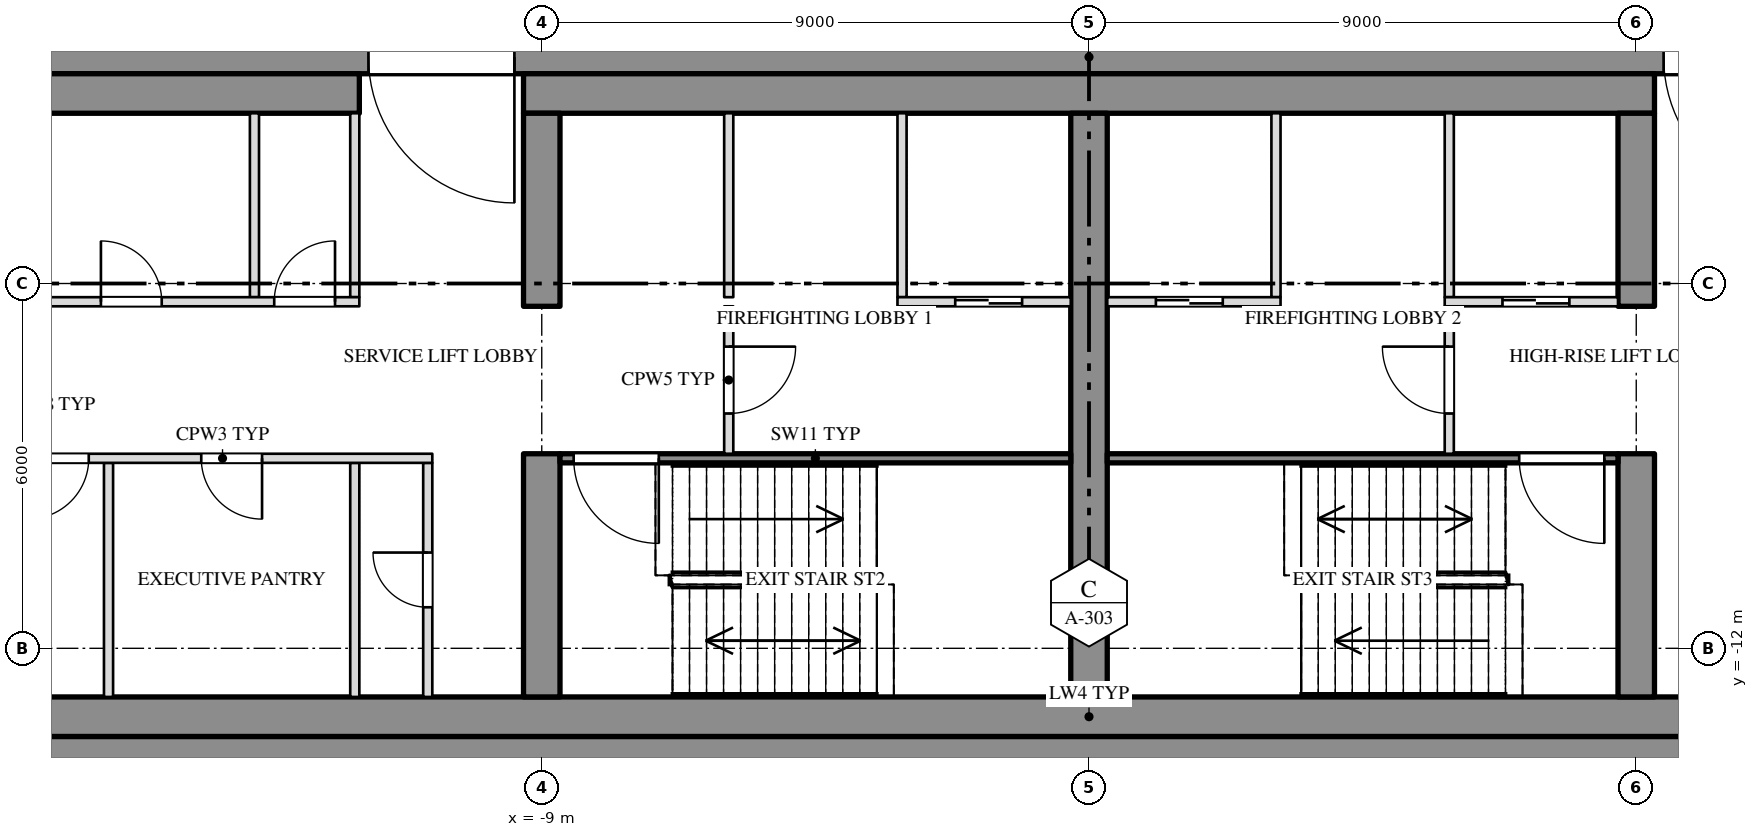
"""IFC4 building model, lengths in metres.
Left out: names, types, materials, properties, quantities, classifications, styles, units other than length and angle.
Written with IfcOpenShell. Run it as: python <this file> out.ifc"""

import sys

from ifc_helpers import new_model, si_unit, direction, frame, frame_2d, origin, place, context, subcontext, project, spatial, rectangle, extrude, element, fill, save


model = new_model("IFC4")
c1 = context("Model", 3, precision=1e-05, world=origin(), true_north=direction((0.0, 1.0)))
c2 = subcontext(c1, "Body", "Model", "MODEL_VIEW")
j1 = project(units=[si_unit("LENGTHUNIT", "METRE"), si_unit("PLANEANGLEUNIT", "RADIAN")], contexts=[c1])
p1 = place(None, origin())
s1 = spatial("IfcSite", under=j1, at=p1, CompositionType="ELEMENT")
p2 = place(p1, origin())
s2 = spatial("IfcBuilding", under=s1, at=p2, CompositionType="ELEMENT")
p3 = place(p2, frame((0.0, 0.0, 284.5)))
s3 = spatial("IfcBuildingStorey", under=s2, at=p3, CompositionType="ELEMENT", Elevation=284.5)
p4 = place(p3, frame((-27.0, -2.275, 0.0), z_axis=(0.0, 0.0, 1.0), x_axis=(1.0, 0.0, 0.0)))
e1 = element("IfcWall", 1, at=p4, inside=s3, PredefinedType="SHEAR", context=c2, shape_type="SweptSolid", body=[
    extrude(rectangle(XDim=54.0, YDim=0.55, at=frame_2d((27.0, 0.0))), origin(), (0.0, 0.0, 1.0), 3.78),
])
p5 = place(p4, frame((15.15, 0.0, 0.0)))
e2 = element("IfcOpeningElement", 2, at=p5, cuts=e1, PredefinedType="OPENING", context=c2, shape_type="SweptSolid", body=[
    extrude(rectangle(XDim=2.4, YDim=2.1, at=frame_2d((1.2, 1.05))), frame((0.0, 0.287, 0.0), z_axis=(0.0, -1.0, 0.0), x_axis=(1.0, 0.0, 0.0)), (0.0, 0.0, 1.0), 0.574),
])
p6 = place(p4, frame((36.45, 0.0, 0.0)))
e3 = element("IfcOpeningElement", 3, at=p6, cuts=e1, PredefinedType="OPENING", context=c2, shape_type="SweptSolid", body=[
    extrude(rectangle(XDim=2.4, YDim=2.1, at=frame_2d((1.2, 1.05))), frame((0.0, 0.287, 0.0), z_axis=(0.0, -1.0, 0.0), x_axis=(1.0, 0.0, 0.0)), (0.0, 0.0, 1.0), 0.574),
])
p7 = place(p3, frame((-27.0, -13.725, 0.0), z_axis=(0.0, 0.0, 1.0), x_axis=(1.0, 0.0, 0.0)))
e4 = element("IfcWall", 4, at=p7, inside=s3, PredefinedType="SHEAR", context=c2, shape_type="SweptSolid", body=[
    extrude(rectangle(XDim=54.0, YDim=0.55, at=frame_2d((27.0, 0.0))), origin(), (0.0, 0.0, 1.0), 3.78),
])
p8 = place(p3, frame((-26.45, -2.875, 0.0), z_axis=(0.0, 0.0, 1.0), x_axis=(1.0, 0.0, 0.0)))
e5 = element("IfcWall", 5, at=p8, inside=s3, PredefinedType="SHEAR", context=c2, shape_type="SweptSolid", body=[
    extrude(rectangle(XDim=14.45, YDim=0.65, at=frame_2d((7.225, 0.0))), origin(), (0.0, 0.0, 1.0), 3.78),
])
p9 = place(p3, frame((-9.3, -2.875, 0.0), z_axis=(0.0, 0.0, 1.0), x_axis=(1.0, 0.0, 0.0)))
e6 = element("IfcWall", 6, at=p9, inside=s3, PredefinedType="SHEAR", context=c2, shape_type="SweptSolid", body=[
    extrude(rectangle(XDim=18.6, YDim=0.65, at=frame_2d((9.3, 0.0))), origin(), (0.0, 0.0, 1.0), 3.78),
])
p10 = place(p3, frame((-26.45, -13.125, 0.0), z_axis=(0.0, 0.0, 1.0), x_axis=(1.0, 0.0, 0.0)))
e7 = element("IfcWall", 7, at=p10, inside=s3, PredefinedType="SHEAR", context=c2, shape_type="SweptSolid", body=[
    extrude(rectangle(XDim=52.9, YDim=0.65, at=frame_2d((26.45, 0.0))), origin(), (0.0, 0.0, 1.0), 3.78),
])
p11 = place(p3, frame((-9.0, -12.8, 0.0), z_axis=(0.0, 0.0, 1.0), x_axis=(0.0, 1.0, 0.0)))
e8 = element("IfcWall", 8, at=p11, inside=s3, PredefinedType="SHEAR", context=c2, shape_type="SweptSolid", body=[
    extrude(rectangle(XDim=4.0, YDim=0.6, at=frame_2d((2.0, 0.0))), origin(), (0.0, 0.0, 1.0), 3.78),
])
p12 = place(p3, frame((-9.0, -6.375, 0.0), z_axis=(0.0, 0.0, 1.0), x_axis=(0.0, 1.0, 0.0)))
e9 = element("IfcWall", 9, at=p12, inside=s3, PredefinedType="SHEAR", context=c2, shape_type="SweptSolid", body=[
    extrude(rectangle(XDim=3.175, YDim=0.6, at=frame_2d((1.587, 0.0))), origin(), (0.0, 0.0, 1.0), 3.78),
])
p13 = place(p3, frame((0.0, -12.8, 0.0), z_axis=(0.0, 0.0, 1.0), x_axis=(0.0, 1.0, 0.0)))
e10 = element("IfcWall", 10, at=p13, inside=s3, PredefinedType="SHEAR", context=c2, shape_type="SweptSolid", body=[
    extrude(rectangle(XDim=9.6, YDim=0.6, at=frame_2d((4.8, 0.0))), origin(), (0.0, 0.0, 1.0), 3.78),
])
p14 = place(p3, frame((9.0, -12.8, 0.0), z_axis=(0.0, 0.0, 1.0), x_axis=(0.0, 1.0, 0.0)))
e11 = element("IfcWall", 11, at=p14, inside=s3, PredefinedType="SHEAR", context=c2, shape_type="SweptSolid", body=[
    extrude(rectangle(XDim=4.0, YDim=0.6, at=frame_2d((2.0, 0.0))), origin(), (0.0, 0.0, 1.0), 3.78),
])
p15 = place(p3, frame((9.0, -6.375, 0.0), z_axis=(0.0, 0.0, 1.0), x_axis=(0.0, 1.0, 0.0)))
e12 = element("IfcWall", 12, at=p15, inside=s3, PredefinedType="SHEAR", context=c2, shape_type="SweptSolid", body=[
    extrude(rectangle(XDim=3.175, YDim=0.6, at=frame_2d((1.587, 0.0))), origin(), (0.0, 0.0, 1.0), 3.78),
])
for number, where, z_axis, x_axis in (
    (13, (-12.075, -6.225, 0.0), (0.0, 0.0, 1.0), (0.0, 1.0, 0.0)),
    (14, (-13.725, -6.225, 0.0), (0.0, 0.0, 1.0), (0.0, 1.0, 0.0)),
    (15, (-3.075, -6.225, 0.0), (0.0, 0.0, 1.0), (0.0, 1.0, 0.0)),
    (16, (-5.925, -6.225, 0.0), (0.0, 0.0, 1.0), (0.0, 1.0, 0.0)),
    (17, (3.075, -6.225, 0.0), (0.0, 0.0, 1.0), (0.0, 1.0, 0.0)),
    (18, (5.925, -6.225, 0.0), (0.0, 0.0, 1.0), (0.0, 1.0, 0.0)),
):
    element("IfcWall", number, at=place(p3, frame(where, z_axis=z_axis, x_axis=x_axis)), inside=s3, PredefinedType="PARTITIONING", context=c2, shape_type="SweptSolid", body=[
        extrude(rectangle(XDim=3.025, YDim=0.15, at=frame_2d((1.513, 0.0))), origin(), (0.0, 0.0, 1.0), 3.78),
    ])
p16 = place(p3, frame((-10.875, -12.8, 0.0), z_axis=(0.0, 0.0, 1.0), x_axis=(0.0, 1.0, 0.0)))
e19 = element("IfcWall", 19, at=p16, inside=s3, PredefinedType="PARTITIONING", context=c2, shape_type="SweptSolid", body=[
    extrude(rectangle(XDim=3.85, YDim=0.15, at=frame_2d((1.925, 0.0))), origin(), (0.0, 0.0, 1.0), 3.78),
])
p17 = place(p16, frame((1.475, 0.0, 0.0)))
e20 = element("IfcOpeningElement", 20, at=p17, cuts=e19, PredefinedType="OPENING", context=c2, shape_type="SweptSolid", body=[
    extrude(rectangle(XDim=0.9, YDim=2.1, at=frame_2d((0.45, 1.05))), frame((0.0, 0.087, 0.0), z_axis=(0.0, -1.0, 0.0), x_axis=(1.0, 0.0, 0.0)), (0.0, 0.0, 1.0), 0.174),
])
for number, where, z_axis, x_axis in (
    (21, (-12.075, -12.8, 0.0), (0.0, 0.0, 1.0), (0.0, 1.0, 0.0)),
    (22, (-16.125, -12.8, 0.0), (0.0, 0.0, 1.0), (0.0, 1.0, 0.0)),
):
    element("IfcWall", number, at=place(p3, frame(where, z_axis=z_axis, x_axis=x_axis)), inside=s3, PredefinedType="PARTITIONING", context=c2, shape_type="SweptSolid", body=[
        extrude(rectangle(XDim=3.85, YDim=0.15, at=frame_2d((1.925, 0.0))), origin(), (0.0, 0.0, 1.0), 3.78),
    ])
p18 = place(p3, frame((-5.925, -8.8, 0.0), z_axis=(0.0, 0.0, 1.0), x_axis=(0.0, 1.0, 0.0)))
e23 = element("IfcWall", 23, at=p18, inside=s3, PredefinedType="PARTITIONING", context=c2, shape_type="SweptSolid", body=[
    extrude(rectangle(XDim=2.425, YDim=0.15, at=frame_2d((1.212, 0.0))), origin(), (0.0, 0.0, 1.0), 3.78),
])
p19 = place(p18, frame((0.662, 0.0, 0.0)))
e24 = element("IfcOpeningElement", 24, at=p19, cuts=e23, PredefinedType="OPENING", context=c2, shape_type="SweptSolid", body=[
    extrude(rectangle(XDim=1.1, YDim=2.1, at=frame_2d((0.55, 1.05))), frame((0.0, 0.087, 0.0), z_axis=(0.0, -1.0, 0.0), x_axis=(1.0, 0.0, 0.0)), (0.0, 0.0, 1.0), 0.174),
])
p20 = place(p3, frame((5.925, -8.8, 0.0), z_axis=(0.0, 0.0, 1.0), x_axis=(0.0, 1.0, 0.0)))
e25 = element("IfcWall", 25, at=p20, inside=s3, PredefinedType="PARTITIONING", context=c2, shape_type="SweptSolid", body=[
    extrude(rectangle(XDim=2.425, YDim=0.15, at=frame_2d((1.212, 0.0))), origin(), (0.0, 0.0, 1.0), 3.78),
])
p21 = place(p20, frame((0.662, 0.0, 0.0)))
e26 = element("IfcOpeningElement", 26, at=p21, cuts=e25, PredefinedType="OPENING", context=c2, shape_type="SweptSolid", body=[
    extrude(rectangle(XDim=1.1, YDim=2.1, at=frame_2d((0.55, 1.05))), frame((0.0, 0.087, 0.0), z_axis=(0.0, -1.0, 0.0), x_axis=(1.0, 0.0, 0.0)), (0.0, 0.0, 1.0), 0.174),
])
p22 = place(p3, frame((-17.7, -6.3, 0.0), z_axis=(0.0, 0.0, 1.0), x_axis=(1.0, 0.0, 0.0)))
e27 = element("IfcWall", 27, at=p22, inside=s3, PredefinedType="PARTITIONING", context=c2, shape_type="SweptSolid", body=[
    extrude(rectangle(XDim=5.7, YDim=0.15, at=frame_2d((2.85, 0.0))), origin(), (0.0, 0.0, 1.0), 3.78),
])
p23 = place(p22, frame((1.45, 0.0, 0.0)))
e28 = element("IfcOpeningElement", 28, at=p23, cuts=e27, PredefinedType="OPENING", context=c2, shape_type="SweptSolid", body=[
    extrude(rectangle(XDim=1.0, YDim=2.1, at=frame_2d((0.5, 1.05))), frame((0.0, 0.087, 0.0), z_axis=(0.0, -1.0, 0.0), x_axis=(1.0, 0.0, 0.0)), (0.0, 0.0, 1.0), 0.174),
])
p24 = place(p22, frame((4.3, 0.0, 0.0)))
e29 = element("IfcOpeningElement", 29, at=p24, cuts=e27, PredefinedType="OPENING", context=c2, shape_type="SweptSolid", body=[
    extrude(rectangle(XDim=1.0, YDim=2.1, at=frame_2d((0.5, 1.05))), frame((0.0, 0.087, 0.0), z_axis=(0.0, -1.0, 0.0), x_axis=(1.0, 0.0, 0.0)), (0.0, 0.0, 1.0), 0.174),
])
p25 = place(p3, frame((-3.15, -6.3, 0.0), z_axis=(0.0, 0.0, 1.0), x_axis=(1.0, 0.0, 0.0)))
e30 = element("IfcWall", 30, at=p25, inside=s3, PredefinedType="PARTITIONING", context=c2, shape_type="SweptSolid", body=[
    extrude(rectangle(XDim=2.85, YDim=0.15, at=frame_2d((1.425, 0.0))), origin(), (0.0, 0.0, 1.0), 3.78),
])
p26 = place(p25, frame((0.95, 0.0, 0.0)))
e31 = element("IfcOpeningElement", 31, at=p26, cuts=e30, PredefinedType="OPENING", context=c2, shape_type="SweptSolid", body=[
    extrude(rectangle(XDim=1.1, YDim=2.1, at=frame_2d((0.55, 1.05))), frame((0.0, 0.087, 0.0), z_axis=(0.0, -1.0, 0.0), x_axis=(1.0, 0.0, 0.0)), (0.0, 0.0, 1.0), 0.174),
])
p27 = place(p3, frame((0.3, -6.3, 0.0), z_axis=(0.0, 0.0, 1.0), x_axis=(1.0, 0.0, 0.0)))
e32 = element("IfcWall", 32, at=p27, inside=s3, PredefinedType="PARTITIONING", context=c2, shape_type="SweptSolid", body=[
    extrude(rectangle(XDim=2.85, YDim=0.15, at=frame_2d((1.425, 0.0))), origin(), (0.0, 0.0, 1.0), 3.78),
])
p28 = place(p27, frame((0.8, 0.0, 0.0)))
e33 = element("IfcOpeningElement", 33, at=p28, cuts=e32, PredefinedType="OPENING", context=c2, shape_type="SweptSolid", body=[
    extrude(rectangle(XDim=1.1, YDim=2.1, at=frame_2d((0.55, 1.05))), frame((0.0, 0.087, 0.0), z_axis=(0.0, -1.0, 0.0), x_axis=(1.0, 0.0, 0.0)), (0.0, 0.0, 1.0), 0.174),
])
p29 = place(p3, frame((5.85, -6.3, 0.0), z_axis=(0.0, 0.0, 1.0), x_axis=(1.0, 0.0, 0.0)))
e34 = element("IfcWall", 34, at=p29, inside=s3, PredefinedType="PARTITIONING", context=c2, shape_type="SweptSolid", body=[
    extrude(rectangle(XDim=2.85, YDim=0.15, at=frame_2d((1.425, 0.0))), origin(), (0.0, 0.0, 1.0), 3.78),
])
p30 = place(p29, frame((0.95, 0.0, 0.0)))
e35 = element("IfcOpeningElement", 35, at=p30, cuts=e34, PredefinedType="OPENING", context=c2, shape_type="SweptSolid", body=[
    extrude(rectangle(XDim=1.1, YDim=2.1, at=frame_2d((0.55, 1.05))), frame((0.0, 0.087, 0.0), z_axis=(0.0, -1.0, 0.0), x_axis=(1.0, 0.0, 0.0)), (0.0, 0.0, 1.0), 0.174),
])
p31 = place(p3, frame((-17.7, -8.875, 0.0), z_axis=(0.0, 0.0, 1.0), x_axis=(1.0, 0.0, 0.0)))
e36 = element("IfcWall", 36, at=p31, inside=s3, PredefinedType="PARTITIONING", context=c2, shape_type="SweptSolid", body=[
    extrude(rectangle(XDim=6.9, YDim=0.15, at=frame_2d((3.45, 0.0))), origin(), (0.0, 0.0, 1.0), 3.78),
])
p32 = place(p31, frame((0.25, 0.0, 0.0)))
e37 = element("IfcOpeningElement", 37, at=p32, cuts=e36, PredefinedType="OPENING", context=c2, shape_type="SweptSolid", body=[
    extrude(rectangle(XDim=1.0, YDim=2.1, at=frame_2d((0.5, 1.05))), frame((0.0, 0.087, 0.0), z_axis=(0.0, -1.0, 0.0), x_axis=(1.0, 0.0, 0.0)), (0.0, 0.0, 1.0), 0.174),
])
p33 = place(p31, frame((3.1, 0.0, 0.0)))
e38 = element("IfcOpeningElement", 38, at=p33, cuts=e36, PredefinedType="OPENING", context=c2, shape_type="SweptSolid", body=[
    extrude(rectangle(XDim=1.0, YDim=2.1, at=frame_2d((0.5, 1.05))), frame((0.0, 0.087, 0.0), z_axis=(0.0, -1.0, 0.0), x_axis=(1.0, 0.0, 0.0)), (0.0, 0.0, 1.0), 0.174),
])
p34 = place(p3, frame((-8.7, -8.875, 0.0), z_axis=(0.0, 0.0, 1.0), x_axis=(1.0, 0.0, 0.0)))
e39 = element("IfcWall", 39, at=p34, inside=s3, PredefinedType="SHEAR", context=c2, shape_type="SweptSolid", body=[
    extrude(rectangle(XDim=8.4, YDim=0.15, at=frame_2d((4.2, 0.0))), origin(), (0.0, 0.0, 1.0), 3.78),
])
p35 = place(p34, frame((0.225, 0.0, 0.0)))
e40 = element("IfcOpeningElement", 40, at=p35, cuts=e39, PredefinedType="OPENING", context=c2, shape_type="SweptSolid", body=[
    extrude(rectangle(XDim=1.4, YDim=2.1, at=frame_2d((0.7, 1.05))), frame((0.0, 0.087, 0.0), z_axis=(0.0, -1.0, 0.0), x_axis=(1.0, 0.0, 0.0)), (0.0, 0.0, 1.0), 0.174),
])
p36 = place(p3, frame((0.3, -8.875, 0.0), z_axis=(0.0, 0.0, 1.0), x_axis=(1.0, 0.0, 0.0)))
e41 = element("IfcWall", 41, at=p36, inside=s3, PredefinedType="SHEAR", context=c2, shape_type="SweptSolid", body=[
    extrude(rectangle(XDim=8.4, YDim=0.15, at=frame_2d((4.2, 0.0))), origin(), (0.0, 0.0, 1.0), 3.78),
])
p37 = place(p36, frame((6.775, 0.0, 0.0)))
e42 = element("IfcOpeningElement", 42, at=p37, cuts=e41, PredefinedType="OPENING", context=c2, shape_type="SweptSolid", body=[
    extrude(rectangle(XDim=1.4, YDim=2.1, at=frame_2d((0.7, 1.05))), frame((0.0, 0.087, 0.0), z_axis=(0.0, -1.0, 0.0), x_axis=(1.0, 0.0, 0.0)), (0.0, 0.0, 1.0), 0.174),
])
p38 = place(p32, origin())
e43 = element("IfcDoor", 43, at=p38, inside=s3, OperationType="SINGLE_SWING_RIGHT", PredefinedType="DOOR", context=c2, shape_type="SweptSolid", body=[
    extrude(rectangle(XDim=1.0, YDim=2.1, at=frame_2d((0.5, 1.05))), frame((0.0, 0.025, 0.0), z_axis=(0.0, -1.0, 0.0), x_axis=(1.0, 0.0, 0.0)), (0.0, 0.0, 1.0), 0.05),
])
fill(e37, e43)
p39 = place(p23, origin())
e44 = element("IfcDoor", 44, at=p39, inside=s3, OperationType="SINGLE_SWING_LEFT", PredefinedType="DOOR", context=c2, shape_type="SweptSolid", body=[
    extrude(rectangle(XDim=1.0, YDim=2.1, at=frame_2d((0.5, 1.05))), frame((0.0, 0.025, 0.0), z_axis=(0.0, -1.0, 0.0), x_axis=(1.0, 0.0, 0.0)), (0.0, 0.0, 1.0), 0.05),
])
fill(e28, e44)
p40 = place(p33, origin())
e45 = element("IfcDoor", 45, at=p40, inside=s3, OperationType="SINGLE_SWING_LEFT", PredefinedType="DOOR", context=c2, shape_type="SweptSolid", body=[
    extrude(rectangle(XDim=1.0, YDim=2.1, at=frame_2d((0.5, 1.05))), frame((0.0, 0.025, 0.0), z_axis=(0.0, -1.0, 0.0), x_axis=(1.0, 0.0, 0.0)), (0.0, 0.0, 1.0), 0.05),
])
fill(e38, e45)
p41 = place(p24, origin())
e46 = element("IfcDoor", 46, at=p41, inside=s3, OperationType="SINGLE_SWING_RIGHT", PredefinedType="DOOR", context=c2, shape_type="SweptSolid", body=[
    extrude(rectangle(XDim=1.0, YDim=2.1, at=frame_2d((0.5, 1.05))), frame((0.0, 0.025, 0.0), z_axis=(0.0, -1.0, 0.0), x_axis=(1.0, 0.0, 0.0)), (0.0, 0.0, 1.0), 0.05),
])
fill(e29, e46)
p42 = place(p17, origin())
e47 = element("IfcDoor", 47, at=p42, inside=s3, OperationType="SINGLE_SWING_RIGHT", PredefinedType="DOOR", context=c2, shape_type="SweptSolid", body=[
    extrude(rectangle(XDim=0.9, YDim=2.1, at=frame_2d((0.45, 1.05))), frame((0.0, 0.025, 0.0), z_axis=(0.0, -1.0, 0.0), x_axis=(1.0, 0.0, 0.0)), (0.0, 0.0, 1.0), 0.05),
])
fill(e20, e47)
p43 = place(p5, origin())
e48 = element("IfcDoor", 48, at=p43, inside=s3, OperationType="DOUBLE_DOOR_SINGLE_SWING", PredefinedType="DOOR", context=c2, shape_type="SweptSolid", body=[
    extrude(rectangle(XDim=2.4, YDim=2.1, at=frame_2d((1.2, 1.05))), frame((0.0, 0.025, 0.0), z_axis=(0.0, -1.0, 0.0), x_axis=(1.0, 0.0, 0.0)), (0.0, 0.0, 1.0), 0.05),
])
fill(e2, e48)
p44 = place(p35, origin())
e49 = element("IfcDoor", 49, at=p44, inside=s3, OperationType="DOUBLE_DOOR_SINGLE_SWING", PredefinedType="DOOR", context=c2, shape_type="SweptSolid", body=[
    extrude(rectangle(XDim=1.4, YDim=2.1, at=frame_2d((0.7, 1.05))), frame((0.0, 0.025, 0.0), z_axis=(0.0, -1.0, 0.0), x_axis=(1.0, 0.0, 0.0)), (0.0, 0.0, 1.0), 0.05),
])
fill(e40, e49)
p45 = place(p19, origin())
e50 = element("IfcDoor", 50, at=p45, inside=s3, OperationType="SINGLE_SWING_LEFT", PredefinedType="DOOR", context=c2, shape_type="SweptSolid", body=[
    extrude(rectangle(XDim=1.1, YDim=2.1, at=frame_2d((0.55, 1.05))), frame((0.0, 0.025, 0.0), z_axis=(0.0, -1.0, 0.0), x_axis=(1.0, 0.0, 0.0)), (0.0, 0.0, 1.0), 0.05),
])
fill(e24, e50)
p46 = place(p26, origin())
e51 = element("IfcDoor", 51, at=p46, inside=s3, OperationType="SLIDING_TO_LEFT", PredefinedType="DOOR", context=c2, shape_type="SweptSolid", body=[
    extrude(rectangle(XDim=1.1, YDim=2.1, at=frame_2d((0.55, 1.05))), frame((0.0, 0.025, 0.0), z_axis=(0.0, -1.0, 0.0), x_axis=(1.0, 0.0, 0.0)), (0.0, 0.0, 1.0), 0.05),
])
fill(e31, e51)
p47 = place(p28, origin())
e52 = element("IfcDoor", 52, at=p47, inside=s3, OperationType="SLIDING_TO_RIGHT", PredefinedType="DOOR", context=c2, shape_type="SweptSolid", body=[
    extrude(rectangle(XDim=1.1, YDim=2.1, at=frame_2d((0.55, 1.05))), frame((0.0, 0.025, 0.0), z_axis=(0.0, -1.0, 0.0), x_axis=(1.0, 0.0, 0.0)), (0.0, 0.0, 1.0), 0.05),
])
fill(e33, e52)
p48 = place(p21, origin())
e53 = element("IfcDoor", 53, at=p48, inside=s3, OperationType="SINGLE_SWING_RIGHT", PredefinedType="DOOR", context=c2, shape_type="SweptSolid", body=[
    extrude(rectangle(XDim=1.1, YDim=2.1, at=frame_2d((0.55, 1.05))), frame((0.0, 0.025, 0.0), z_axis=(0.0, -1.0, 0.0), x_axis=(1.0, 0.0, 0.0)), (0.0, 0.0, 1.0), 0.05),
])
fill(e26, e53)
p49 = place(p30, origin())
e54 = element("IfcDoor", 54, at=p49, inside=s3, OperationType="SLIDING_TO_RIGHT", PredefinedType="DOOR", context=c2, shape_type="SweptSolid", body=[
    extrude(rectangle(XDim=1.1, YDim=2.1, at=frame_2d((0.55, 1.05))), frame((0.0, 0.025, 0.0), z_axis=(0.0, -1.0, 0.0), x_axis=(1.0, 0.0, 0.0)), (0.0, 0.0, 1.0), 0.05),
])
fill(e35, e54)
p50 = place(p37, origin())
e55 = element("IfcDoor", 55, at=p50, inside=s3, OperationType="DOUBLE_DOOR_SINGLE_SWING", PredefinedType="DOOR", context=c2, shape_type="SweptSolid", body=[
    extrude(rectangle(XDim=1.4, YDim=2.1, at=frame_2d((0.7, 1.05))), frame((0.0, 0.025, 0.0), z_axis=(0.0, -1.0, 0.0), x_axis=(1.0, 0.0, 0.0)), (0.0, 0.0, 1.0), 0.05),
])
fill(e42, e55)
p51 = place(p6, origin())
e56 = element("IfcDoor", 56, at=p51, inside=s3, OperationType="DOUBLE_DOOR_SINGLE_SWING", PredefinedType="DOOR", context=c2, shape_type="SweptSolid", body=[
    extrude(rectangle(XDim=2.4, YDim=2.1, at=frame_2d((1.2, 1.05))), frame((0.0, 0.025, 0.0), z_axis=(0.0, -1.0, 0.0), x_axis=(1.0, 0.0, 0.0)), (0.0, 0.0, 1.0), 0.05),
])
fill(e3, e56)
save(model, sys.argv[1])
